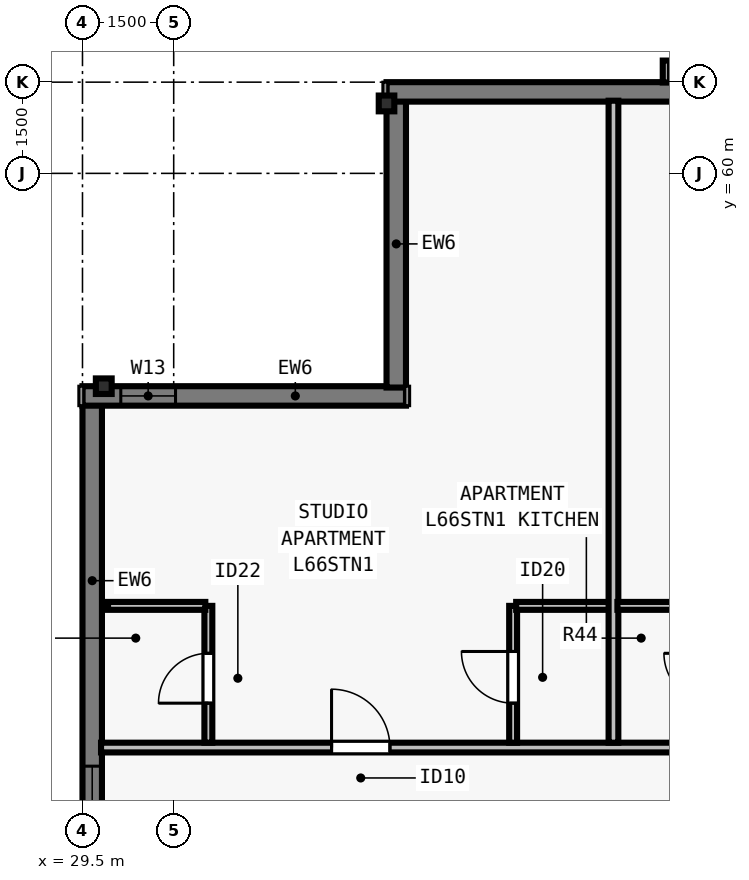
"""IFC4 building model, lengths in metres.
Left out: names, types, materials, properties, quantities, classifications, styles, units other than length and angle.
Written with IfcOpenShell. Run it as: python <this file> out.ifc"""

import sys

from ifc_helpers import new_model, si_unit, direction, frame, frame_2d, origin, origin_2d, place, context, subcontext, project, spatial, rectangle, i_section, extrude, element, fill, save


model = new_model("IFC4")
c1 = context("Model", 3, precision=1e-05, world=origin(), true_north=direction((0.0, 1.0)))
c2 = subcontext(c1, "Body", "Model", "MODEL_VIEW")
j1 = project(units=[si_unit("LENGTHUNIT", "METRE"), si_unit("PLANEANGLEUNIT", "RADIAN")], contexts=[c1])
p1 = place(None, origin())
s1 = spatial("IfcSite", under=j1, at=p1, CompositionType="ELEMENT")
p2 = place(p1, origin())
s2 = spatial("IfcBuilding", under=s1, at=p2, CompositionType="ELEMENT")
p3 = place(p2, frame((0.0, 0.0, 241.0)))
s3 = spatial("IfcBuildingStorey", under=s2, at=p3, CompositionType="ELEMENT", Elevation=241.0)
for number, where, z_axis, x_axis in (
    (1, (34.5, 61.15, 0.0), (0.0, 0.0, 1.0), (1.0, 0.0, 0.0)),
    (2, (29.85, 56.5, 0.0), (0.0, 0.0, 1.0), (0.0, 1.0, 0.0)),
):
    element("IfcColumn", number, at=place(p3, frame(where, z_axis=z_axis, x_axis=x_axis)), inside=s3, PredefinedType="COLUMN", context=c2, shape_type="SweptSolid", body=[
        extrude(i_section(OverallWidth=0.256, OverallDepth=0.26, WebThickness=0.01, FlangeThickness=0.017, FilletRadius=0.013, at=origin_2d()), origin(), (0.0, 0.0, 1.0), 3.5),
    ])
p4 = place(p3, frame((29.66, 42.4, 0.0), z_axis=(0.0, 0.0, 1.0), x_axis=(0.0, 1.0, 0.0)))
e3 = element("IfcWall", 3, at=p4, inside=s3, PredefinedType="SOLIDWALL", context=c2, shape_type="SweptSolid", body=[
    extrude(rectangle(XDim=13.802, YDim=0.32, at=frame_2d((6.901, 0.0))), origin(), (0.0, 0.0, 1.0), 3.29),
])
p5 = place(p4, frame((2.65, 0.0, 0.8)))
e4 = element("IfcOpeningElement", 4, at=p5, cuts=e3, PredefinedType="OPENING", context=c2, shape_type="SweptSolid", body=[
    extrude(rectangle(XDim=1.55, YDim=1.678, at=frame_2d((0.775, 0.839))), frame((0.0, 0.17, 0.0), z_axis=(0.0, -1.0, 0.0), x_axis=(1.0, 0.0, 0.0)), (0.0, 0.0, 1.0), 0.34),
])
p6 = place(p4, frame((6.001, 0.0, 0.8)))
e5 = element("IfcOpeningElement", 5, at=p6, cuts=e3, PredefinedType="OPENING", context=c2, shape_type="SweptSolid", body=[
    extrude(rectangle(XDim=1.85, YDim=1.678, at=frame_2d((0.925, 0.839))), frame((0.0, 0.17, 0.0), z_axis=(0.0, -1.0, 0.0), x_axis=(1.0, 0.0, 0.0)), (0.0, 0.0, 1.0), 0.34),
])
p7 = place(p3, frame((29.5, 56.34, 0.0), z_axis=(0.0, 0.0, 1.0), x_axis=(1.0, 0.0, 0.0)))
e6 = element("IfcWall", 6, at=p7, inside=s3, PredefinedType="SOLIDWALL", context=c2, shape_type="SweptSolid", body=[
    extrude(rectangle(XDim=5.32, YDim=0.32, at=frame_2d((2.66, 0.0))), origin(), (0.0, 0.0, 1.0), 3.29),
])
p8 = place(p7, frame((0.63, 0.0, 0.8)))
e7 = element("IfcOpeningElement", 7, at=p8, cuts=e6, PredefinedType="OPENING", context=c2, shape_type="SweptSolid", body=[
    extrude(rectangle(XDim=0.9, YDim=1.678, at=frame_2d((0.45, 0.839))), frame((0.0, 0.17, 0.0), z_axis=(0.0, -1.0, 0.0), x_axis=(1.0, 0.0, 0.0)), (0.0, 0.0, 1.0), 0.34),
])
p9 = place(p3, frame((34.66, 56.478, 0.0), z_axis=(0.0, 0.0, 1.0), x_axis=(0.0, 1.0, 0.0)))
e8 = element("IfcWall", 8, at=p9, inside=s3, PredefinedType="SOLIDWALL", context=c2, shape_type="SweptSolid", body=[
    extrude(rectangle(XDim=4.724, YDim=0.32, at=frame_2d((2.362, 0.0))), origin(), (0.0, 0.0, 1.0), 3.29),
])
p10 = place(p3, frame((34.5, 61.34, 0.0), z_axis=(0.0, 0.0, 1.0), x_axis=(1.0, 0.0, 0.0)))
e9 = element("IfcWall", 9, at=p10, inside=s3, PredefinedType="SOLIDWALL", context=c2, shape_type="SweptSolid", body=[
    extrude(rectangle(XDim=34.702, YDim=0.32, at=frame_2d((17.351, 0.0))), origin(), (0.0, 0.0, 1.0), 3.29),
])
p11 = place(p10, frame((4.763, 0.0, 0.8)))
e10 = element("IfcOpeningElement", 10, at=p11, cuts=e9, PredefinedType="OPENING", context=c2, shape_type="SweptSolid", body=[
    extrude(rectangle(XDim=1.55, YDim=1.678, at=frame_2d((0.775, 0.839))), frame((0.0, 0.17, 0.0), z_axis=(0.0, -1.0, 0.0), x_axis=(1.0, 0.0, 0.0)), (0.0, 0.0, 1.0), 0.34),
])
p12 = place(p10, frame((7.988, 0.0, 0.8)))
e11 = element("IfcOpeningElement", 11, at=p12, cuts=e9, PredefinedType="OPENING", context=c2, shape_type="SweptSolid", body=[
    extrude(rectangle(XDim=1.85, YDim=1.678, at=frame_2d((0.925, 0.839))), frame((0.0, 0.17, 0.0), z_axis=(0.0, -1.0, 0.0), x_axis=(1.0, 0.0, 0.0)), (0.0, 0.0, 1.0), 0.34),
])
p13 = place(p10, frame((10.263, 0.0, 0.8)))
e12 = element("IfcOpeningElement", 12, at=p13, cuts=e9, PredefinedType="OPENING", context=c2, shape_type="SweptSolid", body=[
    extrude(rectangle(XDim=1.55, YDim=1.678, at=frame_2d((0.775, 0.839))), frame((0.0, 0.17, 0.0), z_axis=(0.0, -1.0, 0.0), x_axis=(1.0, 0.0, 0.0)), (0.0, 0.0, 1.0), 0.34),
])
p14 = place(p10, frame((14.738, 0.0, 0.8)))
e13 = element("IfcOpeningElement", 13, at=p14, cuts=e9, PredefinedType="OPENING", context=c2, shape_type="SweptSolid", body=[
    extrude(rectangle(XDim=1.85, YDim=1.678, at=frame_2d((0.925, 0.839))), frame((0.0, 0.17, 0.0), z_axis=(0.0, -1.0, 0.0), x_axis=(1.0, 0.0, 0.0)), (0.0, 0.0, 1.0), 0.34),
])
p15 = place(p10, frame((18.264, 0.0, 0.8)))
e14 = element("IfcOpeningElement", 14, at=p15, cuts=e9, PredefinedType="OPENING", context=c2, shape_type="SweptSolid", body=[
    extrude(rectangle(XDim=1.55, YDim=1.678, at=frame_2d((0.775, 0.839))), frame((0.0, 0.17, 0.0), z_axis=(0.0, -1.0, 0.0), x_axis=(1.0, 0.0, 0.0)), (0.0, 0.0, 1.0), 0.34),
])
p16 = place(p10, frame((25.014, 0.0, 0.8)))
e15 = element("IfcOpeningElement", 15, at=p16, cuts=e9, PredefinedType="OPENING", context=c2, shape_type="SweptSolid", body=[
    extrude(rectangle(XDim=1.55, YDim=1.678, at=frame_2d((0.775, 0.839))), frame((0.0, 0.17, 0.0), z_axis=(0.0, -1.0, 0.0), x_axis=(1.0, 0.0, 0.0)), (0.0, 0.0, 1.0), 0.34),
])
p17 = place(p10, frame((28.24, 0.0, 0.8)))
e16 = element("IfcOpeningElement", 16, at=p17, cuts=e9, PredefinedType="OPENING", context=c2, shape_type="SweptSolid", body=[
    extrude(rectangle(XDim=1.85, YDim=1.678, at=frame_2d((0.925, 0.839))), frame((0.0, 0.17, 0.0), z_axis=(0.0, -1.0, 0.0), x_axis=(1.0, 0.0, 0.0)), (0.0, 0.0, 1.0), 0.34),
])
p18 = place(p3, frame((29.805, 50.558, 0.0), z_axis=(0.0, 0.0, 1.0), x_axis=(1.0, 0.0, 0.0)))
e17 = element("IfcWall", 17, at=p18, inside=s3, PredefinedType="PARTITIONING", context=c2, shape_type="SweptSolid", body=[
    extrude(rectangle(XDim=44.39, YDim=0.16, at=frame_2d((22.195, 0.0))), origin(), (0.0, 0.0, 1.0), 2.958),
])
p19 = place(p18, frame((3.791, 0.0, 0.0)))
e18 = element("IfcOpeningElement", 18, at=p19, cuts=e17, PredefinedType="OPENING", context=c2, shape_type="SweptSolid", body=[
    extrude(rectangle(XDim=0.96, YDim=2.18, at=frame_2d((0.48, 1.09))), frame((0.0, 0.09, 0.0), z_axis=(0.0, -1.0, 0.0), x_axis=(1.0, 0.0, 0.0)), (0.0, 0.0, 1.0), 0.18),
])
p20 = place(p18, frame((12.803, 0.0, 0.0)))
e19 = element("IfcOpeningElement", 19, at=p20, cuts=e17, PredefinedType="OPENING", context=c2, shape_type="SweptSolid", body=[
    extrude(rectangle(XDim=0.96, YDim=2.18, at=frame_2d((0.48, 1.09))), frame((0.0, 0.09, 0.0), z_axis=(0.0, -1.0, 0.0), x_axis=(1.0, 0.0, 0.0)), (0.0, 0.0, 1.0), 0.18),
])
p21 = place(p18, frame((21.635, 0.0, 0.0)))
e20 = element("IfcOpeningElement", 20, at=p21, cuts=e17, PredefinedType="OPENING", context=c2, shape_type="SweptSolid", body=[
    extrude(rectangle(XDim=0.96, YDim=2.18, at=frame_2d((0.48, 1.09))), frame((0.0, 0.09, 0.0), z_axis=(0.0, -1.0, 0.0), x_axis=(1.0, 0.0, 0.0)), (0.0, 0.0, 1.0), 0.18),
])
p22 = place(p18, frame((30.467, 0.0, 0.0)))
e21 = element("IfcOpeningElement", 21, at=p22, cuts=e17, PredefinedType="OPENING", context=c2, shape_type="SweptSolid", body=[
    extrude(rectangle(XDim=0.96, YDim=2.18, at=frame_2d((0.48, 1.09))), frame((0.0, 0.09, 0.0), z_axis=(0.0, -1.0, 0.0), x_axis=(1.0, 0.0, 0.0)), (0.0, 0.0, 1.0), 0.18),
])
p23 = place(p18, frame((39.559, 0.0, 0.0)))
e22 = element("IfcOpeningElement", 22, at=p23, cuts=e17, PredefinedType="OPENING", context=c2, shape_type="SweptSolid", body=[
    extrude(rectangle(XDim=0.96, YDim=2.18, at=frame_2d((0.48, 1.09))), frame((0.0, 0.09, 0.0), z_axis=(0.0, -1.0, 0.0), x_axis=(1.0, 0.0, 0.0)), (0.0, 0.0, 1.0), 0.18),
])
p24 = place(p3, frame((31.57, 50.637, 0.0), z_axis=(0.0, 0.0, 1.0), x_axis=(0.0, 1.0, 0.0)))
e23 = element("IfcWall", 23, at=p24, inside=s3, PredefinedType="PLUMBINGWALL", context=c2, shape_type="SweptSolid", body=[
    extrude(rectangle(XDim=2.25, YDim=0.13, at=frame_2d((1.125, 0.0))), origin(), (0.0, 0.0, 1.0), 3.29),
])
p25 = place(p24, frame((0.65, 0.0, 0.0)))
e24 = element("IfcOpeningElement", 24, at=p25, cuts=e23, PredefinedType="OPENING", context=c2, shape_type="SweptSolid", body=[
    extrude(rectangle(XDim=0.82, YDim=2.1, at=frame_2d((0.41, 1.05))), frame((0.0, 0.075, 0.0), z_axis=(0.0, -1.0, 0.0), x_axis=(1.0, 0.0, 0.0)), (0.0, 0.0, 1.0), 0.15),
])
p26 = place(p3, frame((29.92, 52.887, 0.0), z_axis=(0.0, 0.0, 1.0), x_axis=(1.0, 0.0, 0.0)))
e25 = element("IfcWall", 25, at=p26, inside=s3, PredefinedType="PLUMBINGWALL", context=c2, shape_type="SweptSolid", body=[
    extrude(rectangle(XDim=1.6, YDim=0.13, at=frame_2d((0.8, 0.0))), origin(), (0.0, 0.0, 1.0), 3.29),
])
p27 = place(p3, frame((36.582, 50.637, 0.0), z_axis=(0.0, 0.0, 1.0), x_axis=(0.0, 1.0, 0.0)))
e26 = element("IfcWall", 26, at=p27, inside=s3, PredefinedType="PLUMBINGWALL", context=c2, shape_type="SweptSolid", body=[
    extrude(rectangle(XDim=2.25, YDim=0.13, at=frame_2d((1.125, 0.0))), origin(), (0.0, 0.0, 1.0), 3.29),
])
p28 = place(p27, frame((0.65, 0.0, 0.0)))
e27 = element("IfcOpeningElement", 27, at=p28, cuts=e26, PredefinedType="OPENING", context=c2, shape_type="SweptSolid", body=[
    extrude(rectangle(XDim=0.85, YDim=2.1, at=frame_2d((0.425, 1.05))), frame((0.0, 0.075, 0.0), z_axis=(0.0, -1.0, 0.0), x_axis=(1.0, 0.0, 0.0)), (0.0, 0.0, 1.0), 0.15),
])
p29 = place(p3, frame((36.632, 52.887, 0.0), z_axis=(0.0, 0.0, 1.0), x_axis=(1.0, 0.0, 0.0)))
e28 = element("IfcWall", 28, at=p29, inside=s3, PredefinedType="PLUMBINGWALL", context=c2, shape_type="SweptSolid", body=[
    extrude(rectangle(XDim=1.6, YDim=0.13, at=frame_2d((0.8, 0.0))), origin(), (0.0, 0.0, 1.0), 3.29),
])
p30 = place(p3, frame((38.232, 50.637, 0.0), z_axis=(0.0, 0.0, 1.0), x_axis=(0.0, 1.0, 0.0)))
e29 = element("IfcWall", 29, at=p30, inside=s3, PredefinedType="PARTITIONING", context=c2, shape_type="SweptSolid", body=[
    extrude(rectangle(XDim=10.558, YDim=0.16, at=frame_2d((5.279, 0.0))), origin(), (0.0, 0.0, 1.0), 2.573),
])
p31 = place(p3, frame((38.297, 52.887, 0.0), z_axis=(0.0, 0.0, 1.0), x_axis=(1.0, 0.0, 0.0)))
e30 = element("IfcWall", 30, at=p31, inside=s3, PredefinedType="PLUMBINGWALL", context=c2, shape_type="SweptSolid", body=[
    extrude(rectangle(XDim=1.535, YDim=0.13, at=frame_2d((0.768, 0.0))), origin(), (0.0, 0.0, 1.0), 3.29),
])
p32 = place(p6, origin())
e31 = element("IfcWindow", 31, at=p32, inside=s3, PartitioningType="SINGLE_PANEL", PredefinedType="WINDOW", context=c2, shape_type="SweptSolid", body=[
    extrude(rectangle(XDim=1.85, YDim=1.678, at=frame_2d((0.925, 0.839))), frame((0.0, -0.05, 0.0), z_axis=(0.0, -1.0, 0.0), x_axis=(1.0, 0.0, 0.0)), (0.0, 0.0, 1.0), 0.06),
])
fill(e5, e31)
p33 = place(p8, origin())
e32 = element("IfcWindow", 32, at=p33, inside=s3, PartitioningType="SINGLE_PANEL", PredefinedType="WINDOW", context=c2, shape_type="SweptSolid", body=[
    extrude(rectangle(XDim=0.9, YDim=1.678, at=frame_2d((0.45, 0.839))), frame((0.0, -0.04, 0.0), z_axis=(0.0, -1.0, 0.0), x_axis=(1.0, 0.0, 0.0)), (0.0, 0.0, 1.0), 0.06),
])
fill(e7, e32)
p34 = place(p25, origin())
e33 = element("IfcDoor", 33, at=p34, inside=s3, OperationType="SINGLE_SWING_LEFT", PredefinedType="DOOR", context=c2, shape_type="SweptSolid", body=[
    extrude(rectangle(XDim=0.82, YDim=2.1, at=frame_2d((0.41, 1.05))), frame((0.0, 0.025, 0.0), z_axis=(0.0, -1.0, 0.0), x_axis=(1.0, 0.0, 0.0)), (0.0, 0.0, 1.0), 0.05),
])
fill(e24, e33)
p35 = place(p28, origin())
e34 = element("IfcDoor", 34, at=p35, inside=s3, OperationType="SINGLE_SWING_RIGHT", PredefinedType="DOOR", context=c2, shape_type="SweptSolid", body=[
    extrude(rectangle(XDim=0.85, YDim=2.1, at=frame_2d((0.425, 1.05))), frame((0.0, 0.025, 0.0), z_axis=(0.0, -1.0, 0.0), x_axis=(1.0, 0.0, 0.0)), (0.0, 0.0, 1.0), 0.05),
])
fill(e27, e34)
p36 = place(p19, origin())
e35 = element("IfcDoor", 35, at=p36, inside=s3, OperationType="SINGLE_SWING_LEFT", PredefinedType="DOOR", context=c2, shape_type="SweptSolid", body=[
    extrude(rectangle(XDim=0.96, YDim=2.18, at=frame_2d((0.48, 1.09))), frame((0.0, 0.025, 0.0), z_axis=(0.0, -1.0, 0.0), x_axis=(1.0, 0.0, 0.0)), (0.0, 0.0, 1.0), 0.05),
])
fill(e18, e35)
save(model, sys.argv[1])
